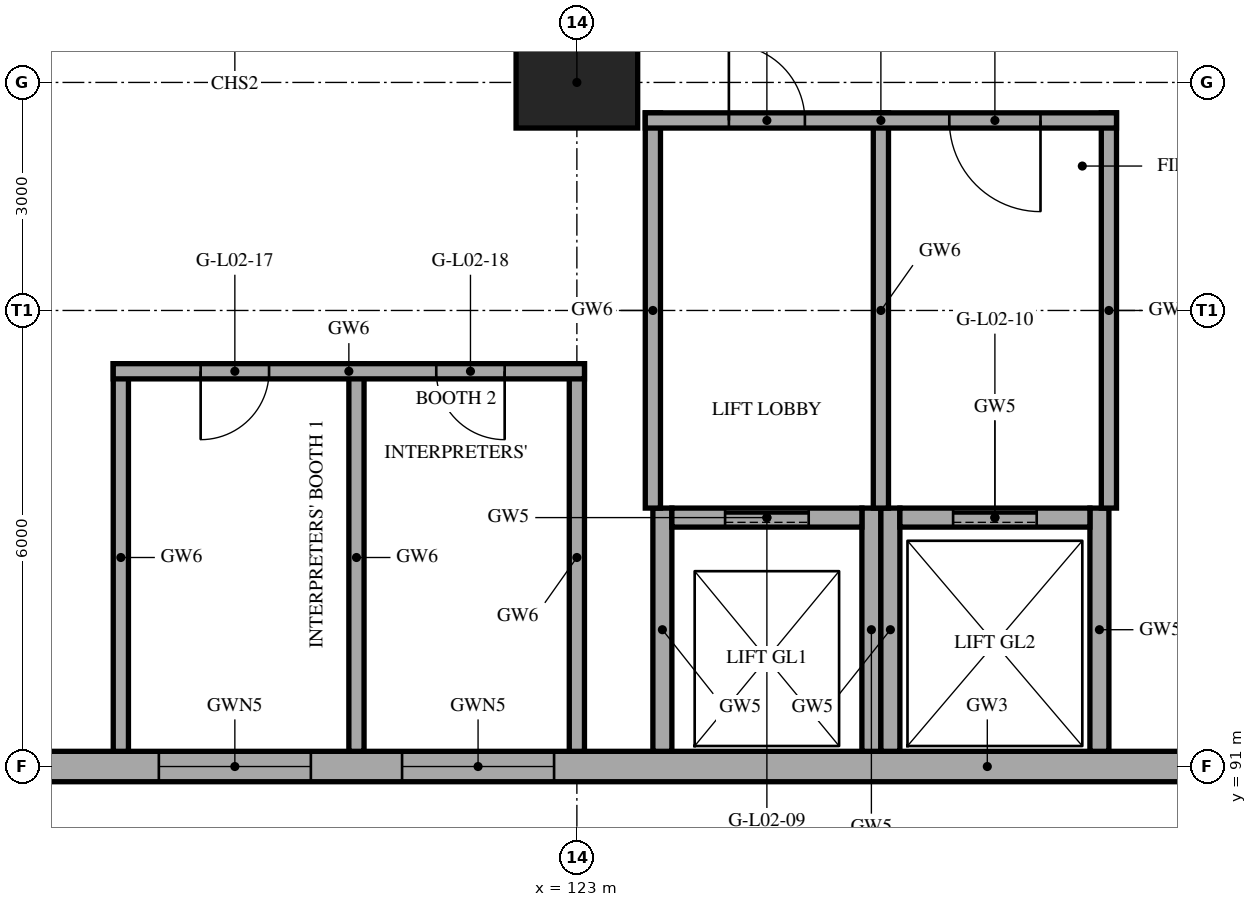
"""IFC4 building model, lengths in metres.
Left out: names, types, materials, properties, quantities, classifications, styles, units other than length and angle.
Written with IfcOpenShell. Run it as: python <this file> out.ifc"""

import sys

from ifc_helpers import new_model, si_unit, direction, frame, frame_2d, origin, origin_2d, place, context, subcontext, project, spatial, rectangle, extrude, element, fill, save


model = new_model("IFC4")
c1 = context("Model", 3, precision=1e-05, world=origin(), true_north=direction((0.0, 1.0)))
c2 = subcontext(c1, "Body", "Model", "MODEL_VIEW")
j1 = project(units=[si_unit("LENGTHUNIT", "METRE"), si_unit("PLANEANGLEUNIT", "RADIAN")], contexts=[c1])
p1 = place(None, origin())
s1 = spatial("IfcSite", under=j1, at=p1, CompositionType="ELEMENT")
p2 = place(p1, origin())
s2 = spatial("IfcBuilding", under=s1, at=p2, CompositionType="ELEMENT")
p3 = place(p2, frame((0.0, 0.0, 10.0)))
s3 = spatial("IfcBuildingStorey", under=s2, at=p3, CompositionType="ELEMENT", Elevation=10.0)
p4 = place(p3, frame((123.0, 100.0, 0.0), z_axis=(0.0, 0.0, 1.0), x_axis=(1.0, 0.0, 0.0)))
e1 = element("IfcColumn", 1, at=p4, inside=s3, PredefinedType="COLUMN", context=c2, shape_type="SweptSolid", body=[
    extrude(rectangle(XDim=1.6, YDim=1.2, at=origin_2d()), origin(), (0.0, 0.0, 1.0), 5.0),
])
p5 = place(p3, frame((107.6, 91.0, 0.0), z_axis=(0.0, 0.0, 1.0), x_axis=(1.0, 0.0, 0.0)))
e2 = element("IfcWall", 2, at=p5, inside=s3, PredefinedType="SHEAR", context=c2, shape_type="SweptSolid", body=[
    extrude(rectangle(XDim=41.6, YDim=0.4, at=frame_2d((20.8, 0.0))), origin(), (0.0, 0.0, 1.0), 5.0),
])
p6 = place(p5, frame((9.9, 0.0, 1.0)))
e3 = element("IfcOpeningElement", 3, at=p6, cuts=e2, PredefinedType="OPENING", context=c2, shape_type="SweptSolid", body=[
    extrude(rectangle(XDim=2.0, YDim=1.2, at=frame_2d((1.0, 0.6))), frame((0.0, 0.21, 0.0), z_axis=(0.0, -1.0, 0.0), x_axis=(1.0, 0.0, 0.0)), (0.0, 0.0, 1.0), 0.42),
])
p7 = place(p5, frame((13.1, 0.0, 1.0)))
e4 = element("IfcOpeningElement", 4, at=p7, cuts=e2, PredefinedType="OPENING", context=c2, shape_type="SweptSolid", body=[
    extrude(rectangle(XDim=2.0, YDim=1.2, at=frame_2d((1.0, 0.6))), frame((0.0, 0.21, 0.0), z_axis=(0.0, -1.0, 0.0), x_axis=(1.0, 0.0, 0.0)), (0.0, 0.0, 1.0), 0.42),
])
p8 = place(p5, frame((2.5, 0.0, 0.0)))
e5 = element("IfcOpeningElement", 5, at=p8, cuts=e2, PredefinedType="OPENING", context=c2, shape_type="SweptSolid", body=[
    extrude(rectangle(XDim=1.8, YDim=2.1, at=frame_2d((0.9, 1.05))), frame((0.0, 0.21, 0.0), z_axis=(0.0, -1.0, 0.0), x_axis=(1.0, 0.0, 0.0)), (0.0, 0.0, 1.0), 0.42),
])
p9 = place(p5, frame((37.5, 0.0, 0.0)))
e6 = element("IfcOpeningElement", 6, at=p9, cuts=e2, PredefinedType="OPENING", context=c2, shape_type="SweptSolid", body=[
    extrude(rectangle(XDim=1.8, YDim=2.1, at=frame_2d((0.9, 1.05))), frame((0.0, 0.21, 0.0), z_axis=(0.0, -1.0, 0.0), x_axis=(1.0, 0.0, 0.0)), (0.0, 0.0, 1.0), 0.42),
])
for number, where, z_axis, x_axis in (
    (7, (124.125, 91.2, 0.0), (0.0, 0.0, 1.0), (0.0, 1.0, 0.0)),
    (8, (126.875, 91.2, 0.0), (0.0, 0.0, 1.0), (0.0, 1.0, 0.0)),
):
    element("IfcWall", number, at=place(p3, frame(where, z_axis=z_axis, x_axis=x_axis)), inside=s3, PredefinedType="SHEAR", context=c2, shape_type="SweptSolid", body=[
        extrude(rectangle(XDim=3.2, YDim=0.25, at=frame_2d((1.6, 0.0))), origin(), (0.0, 0.0, 1.0), 4.6),
    ])
p10 = place(p3, frame((124.25, 94.275, 0.0), z_axis=(0.0, 0.0, 1.0), x_axis=(1.0, 0.0, 0.0)))
e9 = element("IfcWall", 9, at=p10, inside=s3, PredefinedType="SHEAR", context=c2, shape_type="SweptSolid", body=[
    extrude(rectangle(XDim=2.5, YDim=0.25, at=frame_2d((1.25, 0.0))), origin(), (0.0, 0.0, 1.0), 4.6),
])
p11 = place(p10, frame((0.7, 0.0, 0.0)))
e10 = element("IfcOpeningElement", 10, at=p11, cuts=e9, PredefinedType="OPENING", context=c2, shape_type="SweptSolid", body=[
    extrude(rectangle(XDim=1.1, YDim=2.1, at=frame_2d((0.55, 1.05))), frame((0.0, 0.135, 0.0), z_axis=(0.0, -1.0, 0.0), x_axis=(1.0, 0.0, 0.0)), (0.0, 0.0, 1.0), 0.27),
])
for number, where, z_axis, x_axis in (
    (11, (127.125, 91.2, 0.0), (0.0, 0.0, 1.0), (0.0, 1.0, 0.0)),
    (12, (129.875, 91.2, 0.0), (0.0, 0.0, 1.0), (0.0, 1.0, 0.0)),
):
    element("IfcWall", number, at=place(p3, frame(where, z_axis=z_axis, x_axis=x_axis)), inside=s3, PredefinedType="SHEAR", context=c2, shape_type="SweptSolid", body=[
        extrude(rectangle(XDim=3.2, YDim=0.25, at=frame_2d((1.6, 0.0))), origin(), (0.0, 0.0, 1.0), 4.6),
    ])
p12 = place(p3, frame((127.25, 94.275, 0.0), z_axis=(0.0, 0.0, 1.0), x_axis=(1.0, 0.0, 0.0)))
e13 = element("IfcWall", 13, at=p12, inside=s3, PredefinedType="SHEAR", context=c2, shape_type="SweptSolid", body=[
    extrude(rectangle(XDim=2.5, YDim=0.25, at=frame_2d((1.25, 0.0))), origin(), (0.0, 0.0, 1.0), 4.6),
])
p13 = place(p12, frame((0.7, 0.0, 0.0)))
e14 = element("IfcOpeningElement", 14, at=p13, cuts=e13, PredefinedType="OPENING", context=c2, shape_type="SweptSolid", body=[
    extrude(rectangle(XDim=1.1, YDim=2.1, at=frame_2d((0.55, 1.05))), frame((0.0, 0.135, 0.0), z_axis=(0.0, -1.0, 0.0), x_axis=(1.0, 0.0, 0.0)), (0.0, 0.0, 1.0), 0.27),
])
for number, where, z_axis, x_axis in (
    (15, (124.0, 94.4, 0.0), (0.0, 0.0, 1.0), (0.0, 1.0, 0.0)),
    (16, (127.0, 94.4, 0.0), (0.0, 0.0, 1.0), (0.0, 1.0, 0.0)),
    (17, (130.0, 94.4, 0.0), (0.0, 0.0, 1.0), (0.0, 1.0, 0.0)),
):
    element("IfcWall", number, at=place(p3, frame(where, z_axis=z_axis, x_axis=x_axis)), inside=s3, PredefinedType="PARTITIONING", context=c2, shape_type="SweptSolid", body=[
        extrude(rectangle(XDim=5.2, YDim=0.2, at=frame_2d((2.6, 0.0))), origin(), (0.0, 0.0, 1.0), 4.6),
    ])
p14 = place(p3, frame((123.9, 99.5, 0.0), z_axis=(0.0, 0.0, 1.0), x_axis=(1.0, 0.0, 0.0)))
e18 = element("IfcWall", 18, at=p14, inside=s3, PredefinedType="PARTITIONING", context=c2, shape_type="SweptSolid", body=[
    extrude(rectangle(XDim=6.2, YDim=0.2, at=frame_2d((3.1, 0.0))), origin(), (0.0, 0.0, 1.0), 4.6),
])
p15 = place(p14, frame((1.1, 0.0, 0.0)))
e19 = element("IfcOpeningElement", 19, at=p15, cuts=e18, PredefinedType="OPENING", context=c2, shape_type="SweptSolid", body=[
    extrude(rectangle(XDim=1.0, YDim=2.1, at=frame_2d((0.5, 1.05))), frame((0.0, 0.11, 0.0), z_axis=(0.0, -1.0, 0.0), x_axis=(1.0, 0.0, 0.0)), (0.0, 0.0, 1.0), 0.22),
])
p16 = place(p14, frame((4.0, 0.0, 0.0)))
e20 = element("IfcOpeningElement", 20, at=p16, cuts=e18, PredefinedType="OPENING", context=c2, shape_type="SweptSolid", body=[
    extrude(rectangle(XDim=1.2, YDim=2.1, at=frame_2d((0.6, 1.05))), frame((0.0, 0.11, 0.0), z_axis=(0.0, -1.0, 0.0), x_axis=(1.0, 0.0, 0.0)), (0.0, 0.0, 1.0), 0.22),
])
for number, where, z_axis, x_axis in (
    (21, (117.0, 91.2, 0.0), (0.0, 0.0, 1.0), (0.0, 1.0, 0.0)),
    (22, (120.1, 91.2, 0.0), (0.0, 0.0, 1.0), (0.0, 1.0, 0.0)),
    (23, (123.0, 91.2, 0.0), (0.0, 0.0, 1.0), (0.0, 1.0, 0.0)),
):
    element("IfcWall", number, at=place(p3, frame(where, z_axis=z_axis, x_axis=x_axis)), inside=s3, PredefinedType="PARTITIONING", context=c2, shape_type="SweptSolid", body=[
        extrude(rectangle(XDim=5.1, YDim=0.2, at=frame_2d((2.55, 0.0))), origin(), (0.0, 0.0, 1.0), 4.6),
    ])
p17 = place(p3, frame((116.9, 96.2, 0.0), z_axis=(0.0, 0.0, 1.0), x_axis=(1.0, 0.0, 0.0)))
e24 = element("IfcWall", 24, at=p17, inside=s3, PredefinedType="PARTITIONING", context=c2, shape_type="SweptSolid", body=[
    extrude(rectangle(XDim=6.2, YDim=0.2, at=frame_2d((3.1, 0.0))), origin(), (0.0, 0.0, 1.0), 4.6),
])
p18 = place(p17, frame((1.15, 0.0, 0.0)))
e25 = element("IfcOpeningElement", 25, at=p18, cuts=e24, PredefinedType="OPENING", context=c2, shape_type="SweptSolid", body=[
    extrude(rectangle(XDim=0.9, YDim=2.1, at=frame_2d((0.45, 1.05))), frame((0.0, 0.11, 0.0), z_axis=(0.0, -1.0, 0.0), x_axis=(1.0, 0.0, 0.0)), (0.0, 0.0, 1.0), 0.22),
])
p19 = place(p17, frame((4.25, 0.0, 0.0)))
e26 = element("IfcOpeningElement", 26, at=p19, cuts=e24, PredefinedType="OPENING", context=c2, shape_type="SweptSolid", body=[
    extrude(rectangle(XDim=0.9, YDim=2.1, at=frame_2d((0.45, 1.05))), frame((0.0, 0.11, 0.0), z_axis=(0.0, -1.0, 0.0), x_axis=(1.0, 0.0, 0.0)), (0.0, 0.0, 1.0), 0.22),
])
p20 = place(p11, origin())
e27 = element("IfcDoor", 27, at=p20, inside=s3, OperationType="SLIDING_TO_LEFT", PredefinedType="DOOR", context=c2, shape_type="SweptSolid", body=[
    extrude(rectangle(XDim=1.1, YDim=2.1, at=frame_2d((0.55, 1.05))), frame((0.0, 0.025, 0.0), z_axis=(0.0, -1.0, 0.0), x_axis=(1.0, 0.0, 0.0)), (0.0, 0.0, 1.0), 0.05),
])
fill(e10, e27)
p21 = place(p13, origin())
e28 = element("IfcDoor", 28, at=p21, inside=s3, OperationType="SLIDING_TO_LEFT", PredefinedType="DOOR", context=c2, shape_type="SweptSolid", body=[
    extrude(rectangle(XDim=1.1, YDim=2.1, at=frame_2d((0.55, 1.05))), frame((0.0, 0.025, 0.0), z_axis=(0.0, -1.0, 0.0), x_axis=(1.0, 0.0, 0.0)), (0.0, 0.0, 1.0), 0.05),
])
fill(e14, e28)
p22 = place(p15, origin())
e29 = element("IfcDoor", 29, at=p22, inside=s3, OperationType="SINGLE_SWING_LEFT", PredefinedType="DOOR", context=c2, shape_type="SweptSolid", body=[
    extrude(rectangle(XDim=1.0, YDim=2.1, at=frame_2d((0.5, 1.05))), frame((0.0, 0.025, 0.0), z_axis=(0.0, -1.0, 0.0), x_axis=(1.0, 0.0, 0.0)), (0.0, 0.0, 1.0), 0.05),
])
fill(e19, e29)
p23 = place(p16, frame((1.2, 0.0, 0.0), z_axis=(0.0, 0.0, 1.0), x_axis=(-1.0, 0.0, 0.0)))
e30 = element("IfcDoor", 30, at=p23, inside=s3, OperationType="SINGLE_SWING_LEFT", PredefinedType="DOOR", context=c2, shape_type="SweptSolid", body=[
    extrude(rectangle(XDim=1.2, YDim=2.1, at=frame_2d((0.6, 1.05))), frame((0.0, 0.025, 0.0), z_axis=(0.0, -1.0, 0.0), x_axis=(1.0, 0.0, 0.0)), (0.0, 0.0, 1.0), 0.05),
])
fill(e20, e30)
p24 = place(p18, frame((0.9, 0.0, 0.0), z_axis=(0.0, 0.0, 1.0), x_axis=(-1.0, 0.0, 0.0)))
e31 = element("IfcDoor", 31, at=p24, inside=s3, OperationType="SINGLE_SWING_RIGHT", PredefinedType="DOOR", context=c2, shape_type="SweptSolid", body=[
    extrude(rectangle(XDim=0.9, YDim=2.1, at=frame_2d((0.45, 1.05))), frame((0.0, 0.025, 0.0), z_axis=(0.0, -1.0, 0.0), x_axis=(1.0, 0.0, 0.0)), (0.0, 0.0, 1.0), 0.05),
])
fill(e25, e31)
p25 = place(p19, frame((0.9, 0.0, 0.0), z_axis=(0.0, 0.0, 1.0), x_axis=(-1.0, 0.0, 0.0)))
e32 = element("IfcDoor", 32, at=p25, inside=s3, OperationType="SINGLE_SWING_LEFT", PredefinedType="DOOR", context=c2, shape_type="SweptSolid", body=[
    extrude(rectangle(XDim=0.9, YDim=2.1, at=frame_2d((0.45, 1.05))), frame((0.0, 0.025, 0.0), z_axis=(0.0, -1.0, 0.0), x_axis=(1.0, 0.0, 0.0)), (0.0, 0.0, 1.0), 0.05),
])
fill(e26, e32)
p26 = place(p6, origin())
e33 = element("IfcWindow", 33, at=p26, inside=s3, PartitioningType="SINGLE_PANEL", PredefinedType="WINDOW", context=c2, shape_type="SweptSolid", body=[
    extrude(rectangle(XDim=2.0, YDim=1.2, at=frame_2d((1.0, 0.6))), frame((0.0, 0.03, 0.0), z_axis=(0.0, -1.0, 0.0), x_axis=(1.0, 0.0, 0.0)), (0.0, 0.0, 1.0), 0.06),
])
fill(e3, e33)
p27 = place(p7, origin())
e34 = element("IfcWindow", 34, at=p27, inside=s3, PartitioningType="SINGLE_PANEL", PredefinedType="WINDOW", context=c2, shape_type="SweptSolid", body=[
    extrude(rectangle(XDim=2.0, YDim=1.2, at=frame_2d((1.0, 0.6))), frame((0.0, 0.03, 0.0), z_axis=(0.0, -1.0, 0.0), x_axis=(1.0, 0.0, 0.0)), (0.0, 0.0, 1.0), 0.06),
])
fill(e4, e34)
save(model, sys.argv[1])
